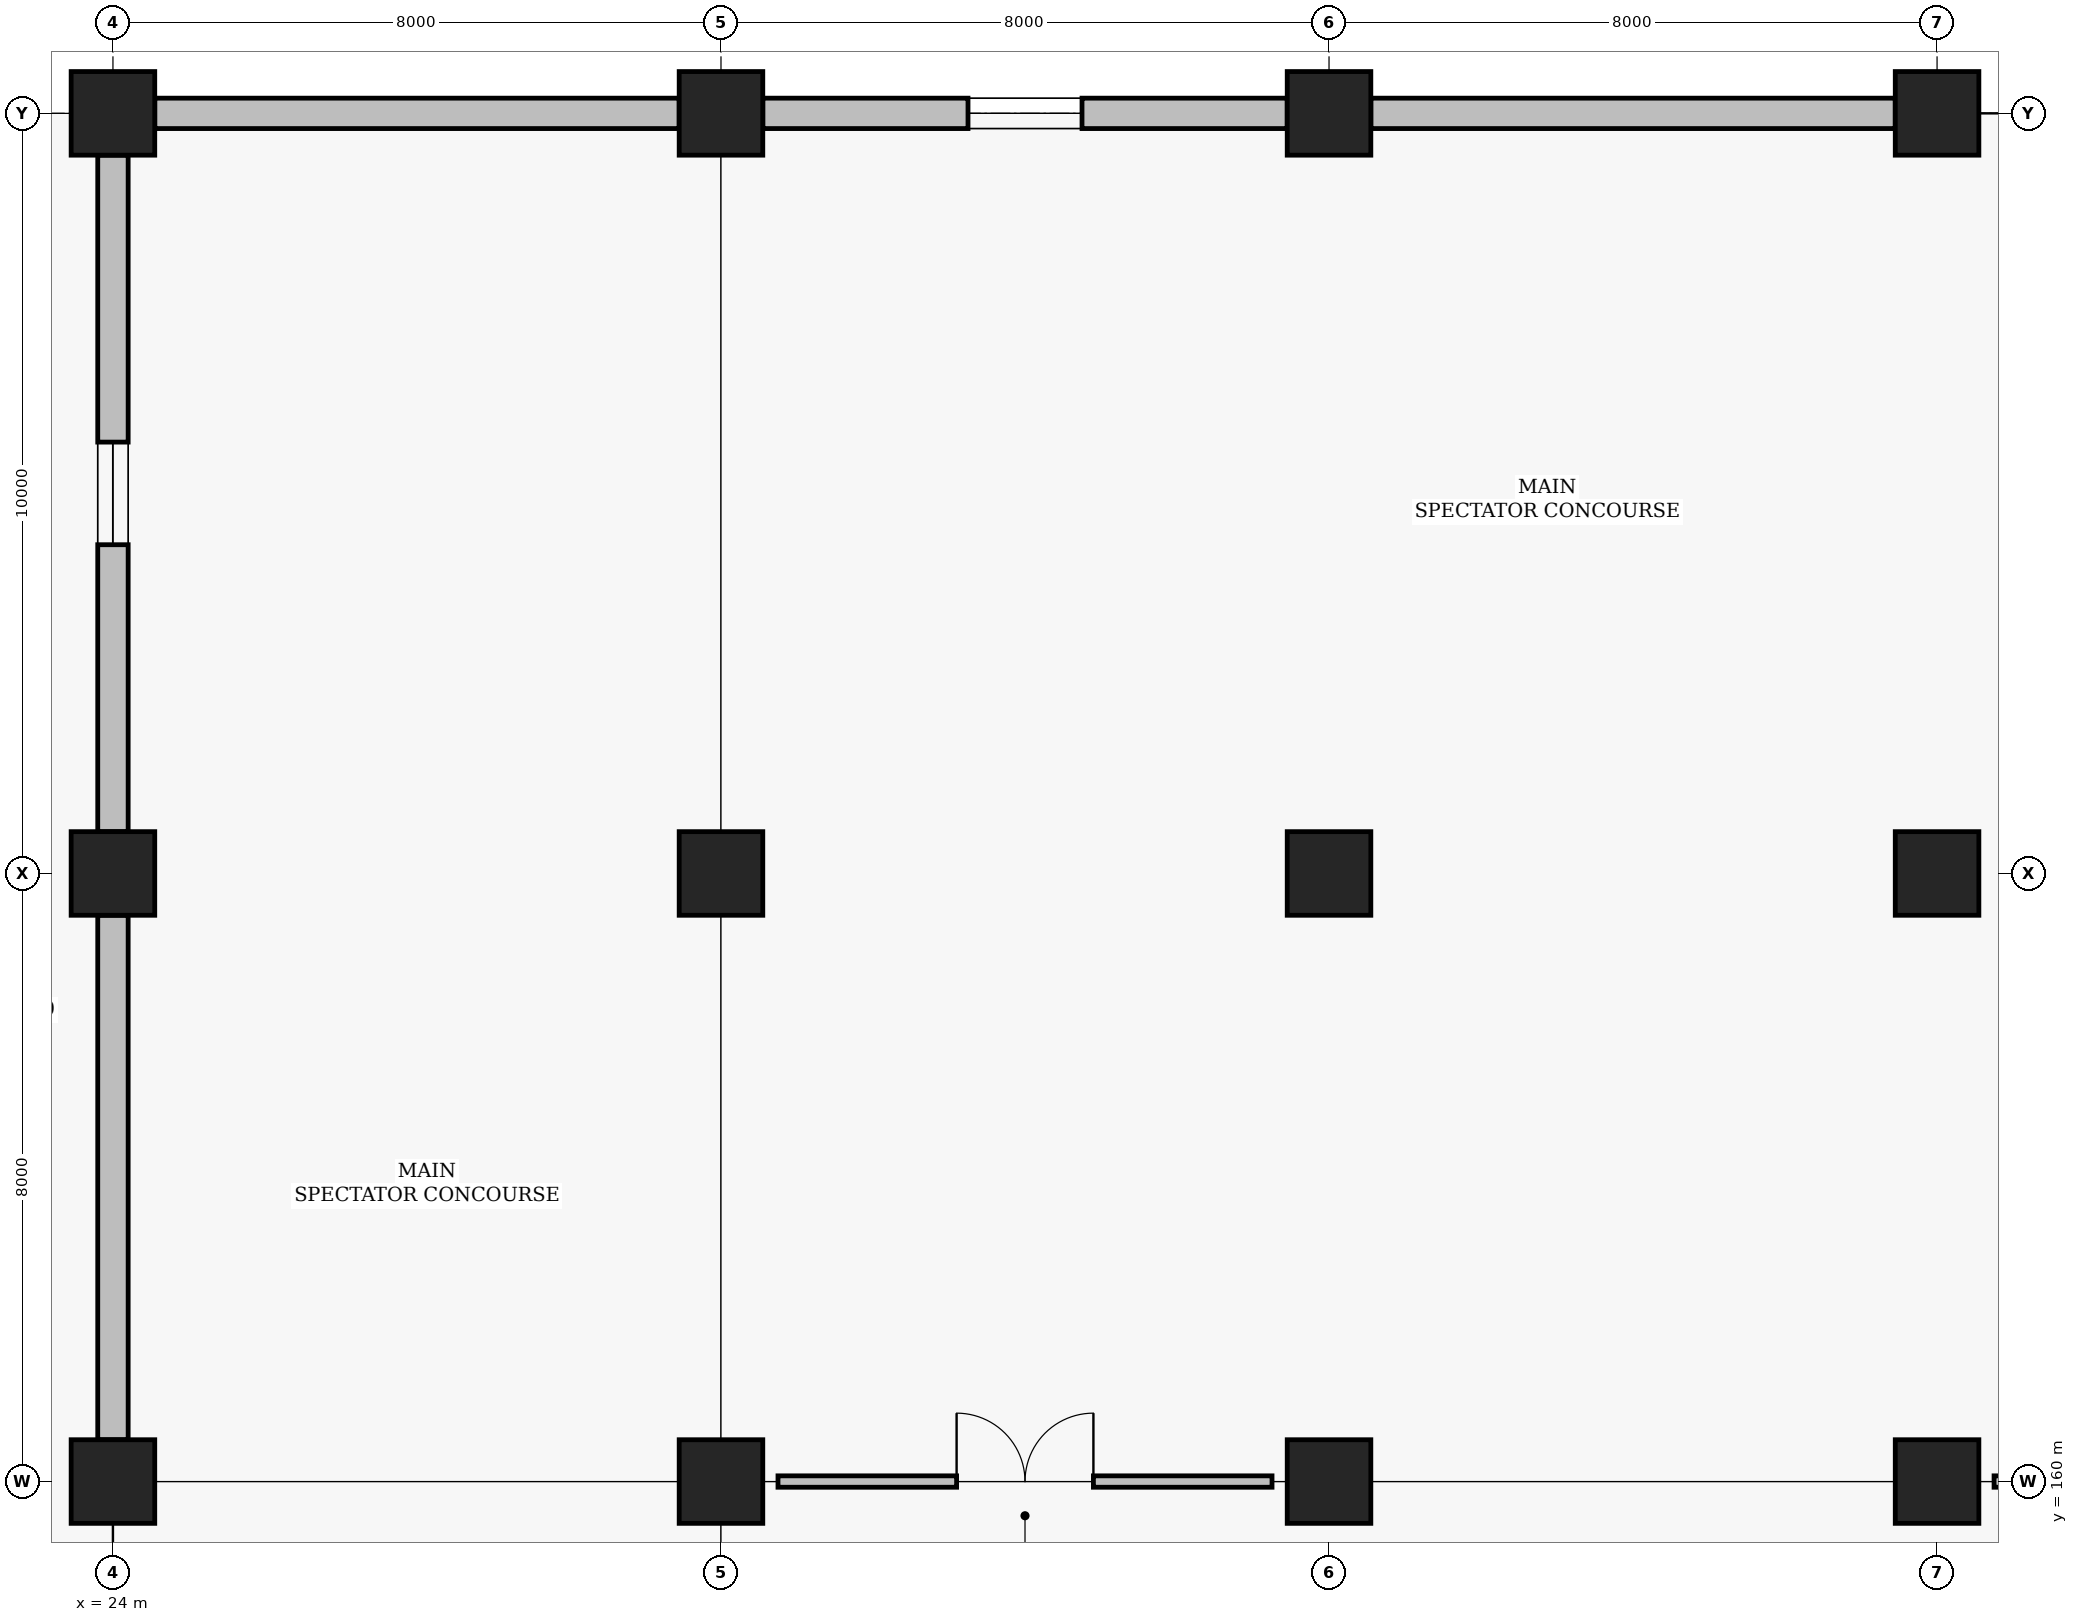
"""IFC4 building model, lengths in metres.
Left out: names, types, materials, properties, quantities, classifications, styles, units other than length and angle.
Written with IfcOpenShell. Run it as: python <this file> out.ifc"""

import sys

from ifc_helpers import new_model, si_unit, direction, frame, frame_2d, origin, origin_2d, place, context, subcontext, project, spatial, rectangle, extrude, element, fill, save


model = new_model("IFC4")
c1 = context("Model", 3, precision=1e-05, world=origin(), true_north=direction((0.0, 1.0)))
c2 = subcontext(c1, "Body", "Model", "MODEL_VIEW")
j1 = project(units=[si_unit("LENGTHUNIT", "METRE"), si_unit("PLANEANGLEUNIT", "RADIAN")], contexts=[c1])
p1 = place(None, origin())
s1 = spatial("IfcSite", under=j1, at=p1, CompositionType="ELEMENT")
p2 = place(p1, origin())
s2 = spatial("IfcBuilding", under=s1, at=p2, CompositionType="ELEMENT")
p3 = place(p2, origin())
s3 = spatial("IfcBuildingStorey", under=s2, at=p3, CompositionType="ELEMENT", Elevation=0.0)
for number, where, z_axis, x_axis in (
    (1, (24.0, 160.0, 0.0), (0.0, 0.0, 1.0), (1.0, 0.0, 0.0)),
    (2, (24.0, 168.0, 0.0), (0.0, 0.0, 1.0), (1.0, 0.0, 0.0)),
    (3, (24.0, 178.0, 0.0), (0.0, 0.0, 1.0), (1.0, 0.0, 0.0)),
    (4, (32.0, 160.0, 0.0), (0.0, 0.0, 1.0), (1.0, 0.0, 0.0)),
    (5, (32.0, 168.0, 0.0), (0.0, 0.0, 1.0), (1.0, 0.0, 0.0)),
    (6, (32.0, 178.0, 0.0), (0.0, 0.0, 1.0), (1.0, 0.0, 0.0)),
    (7, (40.0, 160.0, 0.0), (0.0, 0.0, 1.0), (1.0, 0.0, 0.0)),
    (8, (40.0, 168.0, 0.0), (0.0, 0.0, 1.0), (1.0, 0.0, 0.0)),
    (9, (40.0, 178.0, 0.0), (0.0, 0.0, 1.0), (1.0, 0.0, 0.0)),
    (10, (48.0, 160.0, 0.0), (0.0, 0.0, 1.0), (1.0, 0.0, 0.0)),
    (11, (48.0, 168.0, 0.0), (0.0, 0.0, 1.0), (1.0, 0.0, 0.0)),
    (12, (48.0, 178.0, 0.0), (0.0, 0.0, 1.0), (1.0, 0.0, 0.0)),
):
    element("IfcColumn", number, at=place(p3, frame(where, z_axis=z_axis, x_axis=x_axis)), inside=s3, PredefinedType="COLUMN", context=c2, shape_type="SweptSolid", body=[
        extrude(rectangle(XDim=1.1, YDim=1.1, at=origin_2d()), origin(), (0.0, 0.0, 1.0), 4.8),
    ])
p4 = place(p3, frame((24.0, 160.55, 0.0), z_axis=(0.0, 0.0, 1.0), x_axis=(0.0, 1.0, 0.0)))
e13 = element("IfcWall", 13, at=p4, inside=s3, PredefinedType="SOLIDWALL", context=c2, shape_type="SweptSolid", body=[
    extrude(rectangle(XDim=6.9, YDim=0.4, at=frame_2d((3.45, 0.0))), origin(), (0.0, 0.0, 1.0), 3.87),
])
p5 = place(p3, frame((24.55, 178.0, 0.0), z_axis=(0.0, 0.0, 1.0), x_axis=(1.0, 0.0, 0.0)))
e14 = element("IfcWall", 14, at=p5, inside=s3, PredefinedType="SOLIDWALL", context=c2, shape_type="SweptSolid", body=[
    extrude(rectangle(XDim=6.9, YDim=0.4, at=frame_2d((3.45, 0.0))), origin(), (0.0, 0.0, 1.0), 3.77),
])
p6 = place(p3, frame((24.0, 168.55, 0.0), z_axis=(0.0, 0.0, 1.0), x_axis=(0.0, 1.0, 0.0)))
e15 = element("IfcWall", 15, at=p6, inside=s3, PredefinedType="SOLIDWALL", context=c2, shape_type="SweptSolid", body=[
    extrude(rectangle(XDim=8.9, YDim=0.4, at=frame_2d((4.45, 0.0))), origin(), (0.0, 0.0, 1.0), 3.87),
])
p7 = place(p6, frame((3.775, 0.0, 0.95)))
e16 = element("IfcOpeningElement", 16, at=p7, cuts=e15, PredefinedType="OPENING", context=c2, shape_type="SweptSolid", body=[
    extrude(rectangle(XDim=1.35, YDim=1.6, at=frame_2d((0.675, 0.8))), frame((0.0, 0.21, 0.0), z_axis=(0.0, -1.0, 0.0), x_axis=(1.0, 0.0, 0.0)), (0.0, 0.0, 1.0), 0.42),
])
p8 = place(p3, frame((32.55, 178.0, 0.0), z_axis=(0.0, 0.0, 1.0), x_axis=(1.0, 0.0, 0.0)))
e17 = element("IfcWall", 17, at=p8, inside=s3, PredefinedType="SOLIDWALL", context=c2, shape_type="SweptSolid", body=[
    extrude(rectangle(XDim=6.9, YDim=0.4, at=frame_2d((3.45, 0.0))), origin(), (0.0, 0.0, 1.0), 3.77),
])
p9 = place(p8, frame((2.7, 0.0, 0.95)))
e18 = element("IfcOpeningElement", 18, at=p9, cuts=e17, PredefinedType="OPENING", context=c2, shape_type="SweptSolid", body=[
    extrude(rectangle(XDim=1.5, YDim=1.6, at=frame_2d((0.75, 0.8))), frame((0.0, 0.21, 0.0), z_axis=(0.0, -1.0, 0.0), x_axis=(1.0, 0.0, 0.0)), (0.0, 0.0, 1.0), 0.42),
])
p10 = place(p3, frame((40.55, 178.0, 0.0), z_axis=(0.0, 0.0, 1.0), x_axis=(1.0, 0.0, 0.0)))
e19 = element("IfcWall", 19, at=p10, inside=s3, PredefinedType="SOLIDWALL", context=c2, shape_type="SweptSolid", body=[
    extrude(rectangle(XDim=6.9, YDim=0.4, at=frame_2d((3.45, 0.0))), origin(), (0.0, 0.0, 1.0), 3.77),
])
p11 = place(p3, frame((32.75, 160.0, 0.0), z_axis=(0.0, 0.0, 1.0), x_axis=(1.0, 0.0, 0.0)))
e20 = element("IfcWall", 20, at=p11, inside=s3, PredefinedType="PARTITIONING", context=c2, shape_type="SweptSolid", body=[
    extrude(rectangle(XDim=6.5, YDim=0.15, at=frame_2d((3.25, 0.0))), origin(), (0.0, 0.0, 1.0), 3.87),
])
p12 = place(p11, frame((2.35, 0.0, 0.0)))
e21 = element("IfcOpeningElement", 21, at=p12, cuts=e20, PredefinedType="OPENING", context=c2, shape_type="SweptSolid", body=[
    extrude(rectangle(XDim=1.8, YDim=2.3, at=frame_2d((0.9, 1.15))), frame((0.0, 0.085, 0.0), z_axis=(0.0, -1.0, 0.0), x_axis=(1.0, 0.0, 0.0)), (0.0, 0.0, 1.0), 0.17),
])
p13 = place(p3, frame((48.75, 160.0, 0.0), z_axis=(0.0, 0.0, 1.0), x_axis=(1.0, 0.0, 0.0)))
e22 = element("IfcWall", 22, at=p13, inside=s3, PredefinedType="PARTITIONING", context=c2, shape_type="SweptSolid", body=[
    extrude(rectangle(XDim=6.5, YDim=0.15, at=frame_2d((3.25, 0.0))), origin(), (0.0, 0.0, 1.0), 3.87),
])
p14 = place(p13, frame((2.35, 0.0, 0.0)))
e23 = element("IfcOpeningElement", 23, at=p14, cuts=e22, PredefinedType="OPENING", context=c2, shape_type="SweptSolid", body=[
    extrude(rectangle(XDim=1.8, YDim=2.3, at=frame_2d((0.9, 1.15))), frame((0.0, 0.085, 0.0), z_axis=(0.0, -1.0, 0.0), x_axis=(1.0, 0.0, 0.0)), (0.0, 0.0, 1.0), 0.17),
])
p15 = place(p7, origin())
e24 = element("IfcWindow", 24, at=p15, inside=s3, PartitioningType="SINGLE_PANEL", PredefinedType="WINDOW", context=c2, shape_type="SweptSolid", body=[
    extrude(rectangle(XDim=1.35, YDim=1.6, at=frame_2d((0.675, 0.8))), frame((0.0, 0.03, 0.0), z_axis=(0.0, -1.0, 0.0), x_axis=(1.0, 0.0, 0.0)), (0.0, 0.0, 1.0), 0.06),
])
fill(e16, e24)
p16 = place(p9, origin())
e25 = element("IfcWindow", 25, at=p16, inside=s3, PartitioningType="SINGLE_PANEL", PredefinedType="WINDOW", context=c2, shape_type="SweptSolid", body=[
    extrude(rectangle(XDim=1.5, YDim=1.6, at=frame_2d((0.75, 0.8))), frame((0.0, 0.03, 0.0), z_axis=(0.0, -1.0, 0.0), x_axis=(1.0, 0.0, 0.0)), (0.0, 0.0, 1.0), 0.06),
])
fill(e18, e25)
p17 = place(p12, origin())
e26 = element("IfcDoor", 26, at=p17, inside=s3, OperationType="DOUBLE_SWING_LEFT", PredefinedType="DOOR", context=c2, shape_type="SweptSolid", body=[
    extrude(rectangle(XDim=1.8, YDim=2.3, at=frame_2d((0.9, 1.15))), frame((0.0, 0.025, 0.0), z_axis=(0.0, -1.0, 0.0), x_axis=(1.0, 0.0, 0.0)), (0.0, 0.0, 1.0), 0.05),
])
fill(e21, e26)
save(model, sys.argv[1])
